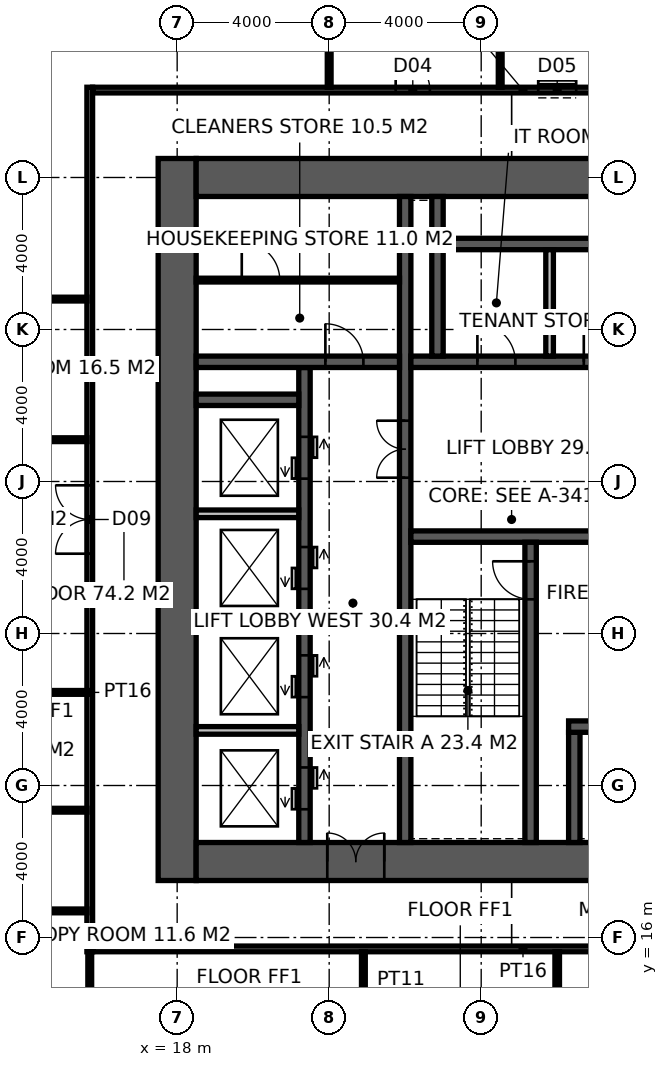
"""IFC4 building model, lengths in metres.
Left out: names, types, materials, properties, quantities, classifications, styles, units other than length and angle.
Written with IfcOpenShell. Run it as: python <this file> out.ifc"""

import sys

from ifc_helpers import new_model, si_unit, direction, frame, frame_2d, origin, place, context, subcontext, project, spatial, rectangle, extrude, element, fill, save


model = new_model("IFC4")
c1 = context("Model", 3, precision=1e-05, world=origin(), true_north=direction((0.0, 1.0)))
c2 = subcontext(c1, "Body", "Model", "MODEL_VIEW")
j1 = project(units=[si_unit("LENGTHUNIT", "METRE"), si_unit("PLANEANGLEUNIT", "RADIAN")], contexts=[c1])
p1 = place(None, origin())
s1 = spatial("IfcSite", under=j1, at=p1, CompositionType="ELEMENT")
p2 = place(p1, origin())
s2 = spatial("IfcBuilding", under=s1, at=p2, CompositionType="ELEMENT")
p3 = place(p2, frame((0.0, 0.0, 266.2)))
s3 = spatial("IfcBuildingStorey", under=s2, at=p3, CompositionType="ELEMENT", Elevation=266.2)
p4 = place(p3, frame((18.0, 17.5, -0.15), z_axis=(0.0, 0.0, 1.0), x_axis=(0.0, 1.0, 0.0)))
e1 = element("IfcWall", 1, at=p4, inside=s3, PredefinedType="SHEAR", context=c2, shape_type="SweptSolid", body=[
    extrude(rectangle(XDim=19.0, YDim=1.0, at=frame_2d((9.5, 0.0))), origin(), (0.0, 0.0, 1.0), 4.0),
])
p5 = place(p3, frame((18.5, 18.0, -0.15), z_axis=(0.0, 0.0, 1.0), x_axis=(1.0, 0.0, 0.0)))
e2 = element("IfcWall", 2, at=p5, inside=s3, PredefinedType="SHEAR", context=c2, shape_type="SweptSolid", body=[
    extrude(rectangle(XDim=17.6, YDim=1.0, at=frame_2d((8.8, 0.0))), origin(), (0.0, 0.0, 1.0), 4.0),
])
p6 = place(p5, frame((3.45, 0.0, 0.15)))
e3 = element("IfcOpeningElement", 3, at=p6, cuts=e2, PredefinedType="OPENING", context=c2, shape_type="SweptSolid", body=[
    extrude(rectangle(XDim=1.5, YDim=2.4, at=frame_2d((0.75, 1.2))), frame((0.0, 0.51, 0.0), z_axis=(0.0, -1.0, 0.0), x_axis=(1.0, 0.0, 0.0)), (0.0, 0.0, 1.0), 1.02),
])
p7 = place(p3, frame((18.5, 36.0, -0.15), z_axis=(0.0, 0.0, 1.0), x_axis=(1.0, 0.0, 0.0)))
e4 = element("IfcWall", 4, at=p7, inside=s3, PredefinedType="SHEAR", context=c2, shape_type="SweptSolid", body=[
    extrude(rectangle(XDim=17.6, YDim=1.0, at=frame_2d((8.8, 0.0))), origin(), (0.0, 0.0, 1.0), 4.0),
])
p8 = place(p3, frame((24.0, 18.5, -0.15), z_axis=(0.0, 0.0, 1.0), x_axis=(0.0, 1.0, 0.0)))
e5 = element("IfcWall", 5, at=p8, inside=s3, PredefinedType="SHEAR", context=c2, shape_type="SweptSolid", body=[
    extrude(rectangle(XDim=17.0, YDim=0.3, at=frame_2d((8.5, 0.0))), origin(), (0.0, 0.0, 1.0), 4.0),
])
p9 = place(p8, frame((9.6, 0.0, 0.15)))
e6 = element("IfcOpeningElement", 6, at=p9, cuts=e5, PredefinedType="OPENING", context=c2, shape_type="SweptSolid", body=[
    extrude(rectangle(XDim=1.5, YDim=2.4, at=frame_2d((0.75, 1.2))), frame((0.0, 0.16, 0.0), z_axis=(0.0, -1.0, 0.0), x_axis=(1.0, 0.0, 0.0)), (0.0, 0.0, 1.0), 0.32),
])
p10 = place(p3, frame((24.15, 26.55, -0.15), z_axis=(0.0, 0.0, 1.0), x_axis=(1.0, 0.0, 0.0)))
e7 = element("IfcWall", 7, at=p10, inside=s3, PredefinedType="SHEAR", context=c2, shape_type="SweptSolid", body=[
    extrude(rectangle(XDim=11.25, YDim=0.3, at=frame_2d((5.625, 0.0))), origin(), (0.0, 0.0, 1.0), 4.0),
])
p11 = place(p10, frame((9.25, 0.0, 0.15)))
e8 = element("IfcOpeningElement", 8, at=p11, cuts=e7, PredefinedType="OPENING", context=c2, shape_type="SweptSolid", body=[
    extrude(rectangle(XDim=1.0, YDim=2.2, at=frame_2d((0.5, 1.1))), frame((0.0, 0.16, 0.0), z_axis=(0.0, -1.0, 0.0), x_axis=(1.0, 0.0, 0.0)), (0.0, 0.0, 1.0), 0.32),
])
p12 = place(p10, frame((4.9, 0.0, 0.15)))
e9 = element("IfcOpeningElement", 9, at=p12, cuts=e7, PredefinedType="OPENING", context=c2, shape_type="SweptSolid", body=[
    extrude(rectangle(XDim=1.5, YDim=2.4, at=frame_2d((0.75, 1.2))), frame((0.0, 0.16, 0.0), z_axis=(0.0, -1.0, 0.0), x_axis=(1.0, 0.0, 0.0)), (0.0, 0.0, 1.0), 0.32),
])
p13 = place(p3, frame((27.3, 18.5, -0.15), z_axis=(0.0, 0.0, 1.0), x_axis=(0.0, 1.0, 0.0)))
e10 = element("IfcWall", 10, at=p13, inside=s3, PredefinedType="SHEAR", context=c2, shape_type="SweptSolid", body=[
    extrude(rectangle(XDim=7.9, YDim=0.3, at=frame_2d((3.95, 0.0))), origin(), (0.0, 0.0, 1.0), 4.0),
])
p14 = place(p13, frame((6.4, 0.0, 0.15)))
e11 = element("IfcOpeningElement", 11, at=p14, cuts=e10, PredefinedType="OPENING", context=c2, shape_type="SweptSolid", body=[
    extrude(rectangle(XDim=1.0, YDim=2.2, at=frame_2d((0.5, 1.1))), frame((0.0, 0.16, 0.0), z_axis=(0.0, -1.0, 0.0), x_axis=(1.0, 0.0, 0.0)), (0.0, 0.0, 1.0), 0.32),
])
p15 = place(p3, frame((28.45, 18.5, -0.15), z_axis=(0.0, 0.0, 1.0), x_axis=(0.0, 1.0, 0.0)))
e12 = element("IfcWall", 12, at=p15, inside=s3, PredefinedType="SHEAR", context=c2, shape_type="SweptSolid", body=[
    extrude(rectangle(XDim=2.9, YDim=0.3, at=frame_2d((1.45, 0.0))), origin(), (0.0, 0.0, 1.0), 4.0),
])
p16 = place(p3, frame((28.3, 21.55, -0.15), z_axis=(0.0, 0.0, 1.0), x_axis=(1.0, 0.0, 0.0)))
e13 = element("IfcWall", 13, at=p16, inside=s3, PredefinedType="SHEAR", context=c2, shape_type="SweptSolid", body=[
    extrude(rectangle(XDim=3.8, YDim=0.3, at=frame_2d((1.9, 0.0))), origin(), (0.0, 0.0, 1.0), 4.0),
])
p17 = place(p16, frame((1.05, 0.0, 0.15)))
e14 = element("IfcOpeningElement", 14, at=p17, cuts=e13, PredefinedType="OPENING", context=c2, shape_type="SweptSolid", body=[
    extrude(rectangle(XDim=1.3, YDim=2.4, at=frame_2d((0.65, 1.2))), frame((0.0, 0.16, 0.0), z_axis=(0.0, -1.0, 0.0), x_axis=(1.0, 0.0, 0.0)), (0.0, 0.0, 1.0), 0.32),
])
p18 = place(p3, frame((24.15, 31.15, -0.15), z_axis=(0.0, 0.0, 1.0), x_axis=(1.0, 0.0, 0.0)))
e15 = element("IfcWall", 15, at=p18, inside=s3, PredefinedType="SHEAR", context=c2, shape_type="SweptSolid", body=[
    extrude(rectangle(XDim=11.25, YDim=0.3, at=frame_2d((5.625, 0.0))), origin(), (0.0, 0.0, 1.0), 4.0),
])
p19 = place(p18, frame((1.75, 0.0, 0.15)))
e16 = element("IfcOpeningElement", 16, at=p19, cuts=e15, PredefinedType="OPENING", context=c2, shape_type="SweptSolid", body=[
    extrude(rectangle(XDim=1.0, YDim=2.2, at=frame_2d((0.5, 1.1))), frame((0.0, 0.16, 0.0), z_axis=(0.0, -1.0, 0.0), x_axis=(1.0, 0.0, 0.0)), (0.0, 0.0, 1.0), 0.32),
])
p20 = place(p18, frame((4.55, 0.0, 0.15)))
e17 = element("IfcOpeningElement", 17, at=p20, cuts=e15, PredefinedType="OPENING", context=c2, shape_type="SweptSolid", body=[
    extrude(rectangle(XDim=1.0, YDim=2.2, at=frame_2d((0.5, 1.1))), frame((0.0, 0.16, 0.0), z_axis=(0.0, -1.0, 0.0), x_axis=(1.0, 0.0, 0.0)), (0.0, 0.0, 1.0), 0.32),
])
p21 = place(p18, frame((7.25, 0.0, 0.15)))
e18 = element("IfcOpeningElement", 18, at=p21, cuts=e15, PredefinedType="OPENING", context=c2, shape_type="SweptSolid", body=[
    extrude(rectangle(XDim=1.4, YDim=2.4, at=frame_2d((0.7, 1.2))), frame((0.0, 0.16, 0.0), z_axis=(0.0, -1.0, 0.0), x_axis=(1.0, 0.0, 0.0)), (0.0, 0.0, 1.0), 0.32),
])
p22 = place(p3, frame((21.35, 18.5, -0.15), z_axis=(0.0, 0.0, 1.0), x_axis=(0.0, 1.0, 0.0)))
e19 = element("IfcWall", 19, at=p22, inside=s3, PredefinedType="SHEAR", context=c2, shape_type="SweptSolid", body=[
    extrude(rectangle(XDim=12.5, YDim=0.3, at=frame_2d((6.25, 0.0))), origin(), (0.0, 0.0, 1.0), 4.0),
])
p23 = place(p22, frame((0.875, 0.0, 0.15)))
e20 = element("IfcOpeningElement", 20, at=p23, cuts=e19, PredefinedType="OPENING", context=c2, shape_type="SweptSolid", body=[
    extrude(rectangle(XDim=1.1, YDim=2.2, at=frame_2d((0.55, 1.1))), frame((0.0, 0.16, 0.0), z_axis=(0.0, -1.0, 0.0), x_axis=(1.0, 0.0, 0.0)), (0.0, 0.0, 1.0), 0.32),
])
p24 = place(p22, frame((3.825, 0.0, 0.15)))
e21 = element("IfcOpeningElement", 21, at=p24, cuts=e19, PredefinedType="OPENING", context=c2, shape_type="SweptSolid", body=[
    extrude(rectangle(XDim=1.1, YDim=2.2, at=frame_2d((0.55, 1.1))), frame((0.0, 0.16, 0.0), z_axis=(0.0, -1.0, 0.0), x_axis=(1.0, 0.0, 0.0)), (0.0, 0.0, 1.0), 0.32),
])
p25 = place(p22, frame((6.675, 0.0, 0.15)))
e22 = element("IfcOpeningElement", 22, at=p25, cuts=e19, PredefinedType="OPENING", context=c2, shape_type="SweptSolid", body=[
    extrude(rectangle(XDim=1.1, YDim=2.2, at=frame_2d((0.55, 1.1))), frame((0.0, 0.16, 0.0), z_axis=(0.0, -1.0, 0.0), x_axis=(1.0, 0.0, 0.0)), (0.0, 0.0, 1.0), 0.32),
])
p26 = place(p22, frame((9.575, 0.0, 0.15)))
e23 = element("IfcOpeningElement", 23, at=p26, cuts=e19, PredefinedType="OPENING", context=c2, shape_type="SweptSolid", body=[
    extrude(rectangle(XDim=1.1, YDim=2.2, at=frame_2d((0.55, 1.1))), frame((0.0, 0.16, 0.0), z_axis=(0.0, -1.0, 0.0), x_axis=(1.0, 0.0, 0.0)), (0.0, 0.0, 1.0), 0.32),
])
p27 = place(p3, frame((18.5, 31.15, -0.15), z_axis=(0.0, 0.0, 1.0), x_axis=(1.0, 0.0, 0.0)))
e24 = element("IfcWall", 24, at=p27, inside=s3, PredefinedType="SHEAR", context=c2, shape_type="SweptSolid", body=[
    extrude(rectangle(XDim=5.35, YDim=0.3, at=frame_2d((2.675, 0.0))), origin(), (0.0, 0.0, 1.0), 4.0),
])
p28 = place(p27, frame((3.4, 0.0, 0.15)))
e25 = element("IfcOpeningElement", 25, at=p28, cuts=e24, PredefinedType="OPENING", context=c2, shape_type="SweptSolid", body=[
    extrude(rectangle(XDim=1.0, YDim=2.2, at=frame_2d((0.5, 1.1))), frame((0.0, 0.16, 0.0), z_axis=(0.0, -1.0, 0.0), x_axis=(1.0, 0.0, 0.0)), (0.0, 0.0, 1.0), 0.32),
])
p29 = place(p3, frame((18.5, 30.15, -0.15), z_axis=(0.0, 0.0, 1.0), x_axis=(1.0, 0.0, 0.0)))
e26 = element("IfcWall", 26, at=p29, inside=s3, PredefinedType="SHEAR", context=c2, shape_type="SweptSolid", body=[
    extrude(rectangle(XDim=2.7, YDim=0.3, at=frame_2d((1.35, 0.0))), origin(), (0.0, 0.0, 1.0), 4.0),
])
p30 = place(p3, frame((24.85, 31.3, -0.15), z_axis=(0.0, 0.0, 1.0), x_axis=(0.0, 1.0, 0.0)))
e27 = element("IfcWall", 27, at=p30, inside=s3, PredefinedType="SHEAR", context=c2, shape_type="SweptSolid", body=[
    extrude(rectangle(XDim=4.2, YDim=0.3, at=frame_2d((2.1, 0.0))), origin(), (0.0, 0.0, 1.0), 4.0),
])
p31 = place(p3, frame((25.0, 34.25, -0.15), z_axis=(0.0, 0.0, 1.0), x_axis=(1.0, 0.0, 0.0)))
e28 = element("IfcWall", 28, at=p31, inside=s3, PredefinedType="SHEAR", context=c2, shape_type="SweptSolid", body=[
    extrude(rectangle(XDim=8.6, YDim=0.3, at=frame_2d((4.3, 0.0))), origin(), (0.0, 0.0, 1.0), 4.0),
])
p32 = place(p3, frame((27.8, 31.3, 0.0), z_axis=(0.0, 0.0, 1.0), x_axis=(0.0, 1.0, 0.0)))
e29 = element("IfcWall", 29, at=p32, inside=s3, PredefinedType="SOLIDWALL", context=c2, shape_type="SweptSolid", body=[
    extrude(rectangle(XDim=2.8, YDim=0.2, at=frame_2d((1.4, 0.0))), origin(), (0.0, 0.0, 1.0), 3.85),
])
for number, where, z_axis, x_axis in (
    (30, (18.5, 21.45, -0.15), (0.0, 0.0, 1.0), (1.0, 0.0, 0.0)),
    (31, (18.5, 24.3, -0.15), (0.0, 0.0, 1.0), (1.0, 0.0, 0.0)),
    (32, (18.5, 27.15, -0.15), (0.0, 0.0, 1.0), (1.0, 0.0, 0.0)),
):
    element("IfcWall", number, at=place(p3, frame(where, z_axis=z_axis, x_axis=x_axis)), inside=s3, PredefinedType="SOLIDWALL", context=c2, shape_type="SweptSolid", body=[
        extrude(rectangle(XDim=2.7, YDim=0.2, at=frame_2d((1.35, 0.0))), origin(), (0.0, 0.0, 1.0), 4.0),
    ])
p33 = place(p3, frame((18.5, 33.3, 0.0), z_axis=(0.0, 0.0, 1.0), x_axis=(1.0, 0.0, 0.0)))
e33 = element("IfcWall", 33, at=p33, inside=s3, PredefinedType="PARTITIONING", context=c2, shape_type="SweptSolid", body=[
    extrude(rectangle(XDim=5.35, YDim=0.1, at=frame_2d((2.675, 0.0))), origin(), (0.0, 0.0, 1.0), 3.85),
])
p34 = place(p33, frame((1.2, 0.0, 0.0)))
e34 = element("IfcOpeningElement", 34, at=p34, cuts=e33, PredefinedType="OPENING", context=c2, shape_type="SweptSolid", body=[
    extrude(rectangle(XDim=1.0, YDim=2.2, at=frame_2d((0.5, 1.1))), frame((0.0, 0.06, 0.0), z_axis=(0.0, -1.0, 0.0), x_axis=(1.0, 0.0, 0.0)), (0.0, 0.0, 1.0), 0.12),
])
p35 = place(p3, frame((15.7, 15.625, 0.0), z_axis=(0.0, 0.0, 1.0), x_axis=(0.0, 1.0, 0.0)))
e35 = element("IfcWall", 35, at=p35, inside=s3, PredefinedType="PARTITIONING", context=c2, shape_type="SweptSolid", body=[
    extrude(rectangle(XDim=22.75, YDim=0.15, at=frame_2d((11.375, 0.0))), origin(), (0.0, 0.0, 1.0), 3.85),
])
p36 = place(p35, frame((10.475, 0.0, 0.0)))
e36 = element("IfcOpeningElement", 36, at=p36, cuts=e35, PredefinedType="OPENING", context=c2, shape_type="SweptSolid", body=[
    extrude(rectangle(XDim=1.8, YDim=2.4, at=frame_2d((0.9, 1.2))), frame((0.0, 0.085, 0.0), z_axis=(0.0, -1.0, 0.0), x_axis=(1.0, 0.0, 0.0)), (0.0, 0.0, 1.0), 0.17),
])
p37 = place(p3, frame((15.775, 15.7, 0.0), z_axis=(0.0, 0.0, 1.0), x_axis=(1.0, 0.0, 0.0)))
e37 = element("IfcWall", 37, at=p37, inside=s3, PredefinedType="PARTITIONING", context=c2, shape_type="SweptSolid", body=[
    extrude(rectangle(XDim=22.65, YDim=0.15, at=frame_2d((11.325, 0.0))), origin(), (0.0, 0.0, 1.0), 3.85),
])
p38 = place(p3, frame((15.775, 38.3, 0.0), z_axis=(0.0, 0.0, 1.0), x_axis=(1.0, 0.0, 0.0)))
e38 = element("IfcWall", 38, at=p38, inside=s3, PredefinedType="PARTITIONING", context=c2, shape_type="SweptSolid", body=[
    extrude(rectangle(XDim=22.65, YDim=0.15, at=frame_2d((11.325, 0.0))), origin(), (0.0, 0.0, 1.0), 3.85),
])
p39 = place(p38, frame((7.975, 0.0, 0.0)))
e39 = element("IfcOpeningElement", 39, at=p39, cuts=e38, PredefinedType="OPENING", context=c2, shape_type="SweptSolid", body=[
    extrude(rectangle(XDim=0.9, YDim=2.1, at=frame_2d((0.45, 1.05))), frame((0.0, 0.085, 0.0), z_axis=(0.0, -1.0, 0.0), x_axis=(1.0, 0.0, 0.0)), (0.0, 0.0, 1.0), 0.17),
])
p40 = place(p38, frame((11.725, 0.0, 0.0)))
e40 = element("IfcOpeningElement", 40, at=p40, cuts=e38, PredefinedType="OPENING", context=c2, shape_type="SweptSolid", body=[
    extrude(rectangle(XDim=1.0, YDim=2.1, at=frame_2d((0.5, 1.05))), frame((0.0, 0.085, 0.0), z_axis=(0.0, -1.0, 0.0), x_axis=(1.0, 0.0, 0.0)), (0.0, 0.0, 1.0), 0.17),
])
p41 = place(p38, frame((15.575, 0.0, 0.0)))
e41 = element("IfcOpeningElement", 41, at=p41, cuts=e38, PredefinedType="OPENING", context=c2, shape_type="SweptSolid", body=[
    extrude(rectangle(XDim=0.9, YDim=2.1, at=frame_2d((0.45, 1.05))), frame((0.0, 0.085, 0.0), z_axis=(0.0, -1.0, 0.0), x_axis=(1.0, 0.0, 0.0)), (0.0, 0.0, 1.0), 0.17),
])
p42 = place(p3, frame((22.0, 38.375, 0.0), z_axis=(0.0, 0.0, 1.0), x_axis=(0.0, 1.0, 0.0)))
e42 = element("IfcWall", 42, at=p42, inside=s3, PredefinedType="PARTITIONING", context=c2, shape_type="SweptSolid", body=[
    extrude(rectangle(XDim=3.675, YDim=0.1, at=frame_2d((1.837, 0.0))), origin(), (0.0, 0.0, 1.0), 2.65),
])
p43 = place(p3, frame((26.5, 38.375, 0.0), z_axis=(0.0, 0.0, 1.0), x_axis=(0.0, 1.0, 0.0)))
e43 = element("IfcWall", 43, at=p43, inside=s3, PredefinedType="PARTITIONING", context=c2, shape_type="SweptSolid", body=[
    extrude(rectangle(XDim=3.575, YDim=0.1, at=frame_2d((1.788, 0.0))), origin(), (0.0, 0.0, 1.0), 2.65),
])
p44 = place(p3, frame((28.0, 4.3, 0.0), z_axis=(0.0, 0.0, 1.0), x_axis=(0.0, 1.0, 0.0)))
e44 = element("IfcWall", 44, at=p44, inside=s3, PredefinedType="PARTITIONING", context=c2, shape_type="SweptSolid", body=[
    extrude(rectangle(XDim=11.325, YDim=0.12, at=frame_2d((5.663, 0.0))), origin(), (0.0, 0.0, 1.0), 3.85),
])
p45 = place(p3, frame((10.85, 16.7, 0.0), z_axis=(0.0, 0.0, 1.0), x_axis=(1.0, 0.0, 0.0)))
e45 = element("IfcWall", 45, at=p45, inside=s3, PredefinedType="PARTITIONING", context=c2, shape_type="SweptSolid", body=[
    extrude(rectangle(XDim=4.775, YDim=0.1, at=frame_2d((2.387, 0.0))), origin(), (0.0, 0.0, 1.0), 3.85),
])
p46 = place(p3, frame((10.95, 19.35, 0.0), z_axis=(0.0, 0.0, 1.0), x_axis=(1.0, 0.0, 0.0)))
e46 = element("IfcWall", 46, at=p46, inside=s3, PredefinedType="PARTITIONING", context=c2, shape_type="SweptSolid", body=[
    extrude(rectangle(XDim=4.675, YDim=0.1, at=frame_2d((2.337, 0.0))), origin(), (0.0, 0.0, 1.0), 3.85),
])
for number, where, z_axis, x_axis in (
    (47, (10.85, 22.45, 0.0), (0.0, 0.0, 1.0), (1.0, 0.0, 0.0)),
    (48, (10.85, 29.1, 0.0), (0.0, 0.0, 1.0), (1.0, 0.0, 0.0)),
    (49, (10.85, 32.8, 0.0), (0.0, 0.0, 1.0), (1.0, 0.0, 0.0)),
):
    element("IfcWall", number, at=place(p3, frame(where, z_axis=z_axis, x_axis=x_axis)), inside=s3, PredefinedType="PARTITIONING", context=c2, shape_type="SweptSolid", body=[
        extrude(rectangle(XDim=4.775, YDim=0.1, at=frame_2d((2.387, 0.0))), origin(), (0.0, 0.0, 1.0), 3.85),
    ])
for number, where, z_axis, x_axis in (
    (50, (15.7, 12.15, 0.0), (0.0, 0.0, 1.0), (0.0, 1.0, 0.0)),
    (51, (22.9, 12.15, 0.0), (0.0, 0.0, 1.0), (0.0, 1.0, 0.0)),
):
    element("IfcWall", number, at=place(p3, frame(where, z_axis=z_axis, x_axis=x_axis)), inside=s3, PredefinedType="PARTITIONING", context=c2, shape_type="SweptSolid", body=[
        extrude(rectangle(XDim=3.475, YDim=0.1, at=frame_2d((1.738, 0.0))), origin(), (0.0, 0.0, 1.0), 3.85),
    ])
p47 = place(p14, origin())
e52 = element("IfcDoor", 52, at=p47, inside=s3, OperationType="SINGLE_SWING_RIGHT", PredefinedType="DOOR", context=c2, shape_type="SweptSolid", body=[
    extrude(rectangle(XDim=1.0, YDim=2.2, at=frame_2d((0.5, 1.1))), frame((0.0, 0.025, 0.0), z_axis=(0.0, -1.0, 0.0), x_axis=(1.0, 0.0, 0.0)), (0.0, 0.0, 1.0), 0.05),
])
fill(e11, e52)
p48 = place(p9, origin())
e53 = element("IfcDoor", 53, at=p48, inside=s3, OperationType="DOUBLE_DOOR_DOUBLE_SWING", PredefinedType="DOOR", context=c2, shape_type="SweptSolid", body=[
    extrude(rectangle(XDim=1.5, YDim=2.4, at=frame_2d((0.75, 1.2))), frame((0.0, 0.025, 0.0), z_axis=(0.0, -1.0, 0.0), x_axis=(1.0, 0.0, 0.0)), (0.0, 0.0, 1.0), 0.05),
])
fill(e6, e53)
p49 = place(p28, origin())
e54 = element("IfcDoor", 54, at=p49, inside=s3, OperationType="SINGLE_SWING_LEFT", PredefinedType="DOOR", context=c2, shape_type="SweptSolid", body=[
    extrude(rectangle(XDim=1.0, YDim=2.2, at=frame_2d((0.5, 1.1))), frame((0.0, 0.025, 0.0), z_axis=(0.0, -1.0, 0.0), x_axis=(1.0, 0.0, 0.0)), (0.0, 0.0, 1.0), 0.05),
])
fill(e25, e54)
p50 = place(p34, origin())
e55 = element("IfcDoor", 55, at=p50, inside=s3, OperationType="SINGLE_SWING_LEFT", PredefinedType="DOOR", context=c2, shape_type="SweptSolid", body=[
    extrude(rectangle(XDim=1.0, YDim=2.2, at=frame_2d((0.5, 1.1))), frame((0.0, 0.025, 0.0), z_axis=(0.0, -1.0, 0.0), x_axis=(1.0, 0.0, 0.0)), (0.0, 0.0, 1.0), 0.05),
])
fill(e34, e55)
p51 = place(p19, origin())
e56 = element("IfcDoor", 56, at=p51, inside=s3, OperationType="SINGLE_SWING_LEFT", PredefinedType="DOOR", context=c2, shape_type="SweptSolid", body=[
    extrude(rectangle(XDim=1.0, YDim=2.2, at=frame_2d((0.5, 1.1))), frame((0.0, 0.025, 0.0), z_axis=(0.0, -1.0, 0.0), x_axis=(1.0, 0.0, 0.0)), (0.0, 0.0, 1.0), 0.05),
])
fill(e16, e56)
p52 = place(p20, origin())
e57 = element("IfcDoor", 57, at=p52, inside=s3, OperationType="SINGLE_SWING_LEFT", PredefinedType="DOOR", context=c2, shape_type="SweptSolid", body=[
    extrude(rectangle(XDim=1.0, YDim=2.2, at=frame_2d((0.5, 1.1))), frame((0.0, 0.025, 0.0), z_axis=(0.0, -1.0, 0.0), x_axis=(1.0, 0.0, 0.0)), (0.0, 0.0, 1.0), 0.05),
])
fill(e17, e57)
p53 = place(p6, origin())
e58 = element("IfcDoor", 58, at=p53, inside=s3, OperationType="DOUBLE_DOOR_DOUBLE_SWING", PredefinedType="DOOR", context=c2, shape_type="SweptSolid", body=[
    extrude(rectangle(XDim=1.5, YDim=2.4, at=frame_2d((0.75, 1.2))), frame((0.0, 0.025, 0.0), z_axis=(0.0, -1.0, 0.0), x_axis=(1.0, 0.0, 0.0)), (0.0, 0.0, 1.0), 0.05),
])
fill(e3, e58)
p54 = place(p39, origin())
e59 = element("IfcDoor", 59, at=p54, inside=s3, OperationType="SINGLE_SWING_LEFT", PredefinedType="DOOR", context=c2, shape_type="SweptSolid", body=[
    extrude(rectangle(XDim=0.9, YDim=2.1, at=frame_2d((0.45, 1.05))), frame((0.0, 0.025, 0.0), z_axis=(0.0, -1.0, 0.0), x_axis=(1.0, 0.0, 0.0)), (0.0, 0.0, 1.0), 0.05),
])
fill(e39, e59)
p55 = place(p40, origin())
e60 = element("IfcDoor", 60, at=p55, inside=s3, OperationType="SLIDING_TO_LEFT", PredefinedType="DOOR", context=c2, shape_type="SweptSolid", body=[
    extrude(rectangle(XDim=1.0, YDim=2.1, at=frame_2d((0.5, 1.05))), frame((0.0, 0.025, 0.0), z_axis=(0.0, -1.0, 0.0), x_axis=(1.0, 0.0, 0.0)), (0.0, 0.0, 1.0), 0.05),
])
fill(e40, e60)
p56 = place(p36, origin())
e61 = element("IfcDoor", 61, at=p56, inside=s3, OperationType="DOUBLE_DOOR_DOUBLE_SWING", PredefinedType="DOOR", context=c2, shape_type="SweptSolid", body=[
    extrude(rectangle(XDim=1.8, YDim=2.4, at=frame_2d((0.9, 1.2))), frame((0.0, 0.025, 0.0), z_axis=(0.0, -1.0, 0.0), x_axis=(1.0, 0.0, 0.0)), (0.0, 0.0, 1.0), 0.05),
])
fill(e36, e61)
p57 = place(p23, origin())
e62 = element("IfcDoor", 62, at=p57, inside=s3, OperationType="DOUBLE_DOOR_SLIDING", PredefinedType="DOOR", context=c2, shape_type="SweptSolid", body=[
    extrude(rectangle(XDim=1.1, YDim=2.2, at=frame_2d((0.55, 1.1))), frame((0.0, 0.025, 0.0), z_axis=(0.0, -1.0, 0.0), x_axis=(1.0, 0.0, 0.0)), (0.0, 0.0, 1.0), 0.05),
])
fill(e20, e62)
p58 = place(p24, origin())
e63 = element("IfcDoor", 63, at=p58, inside=s3, OperationType="DOUBLE_DOOR_SLIDING", PredefinedType="DOOR", context=c2, shape_type="SweptSolid", body=[
    extrude(rectangle(XDim=1.1, YDim=2.2, at=frame_2d((0.55, 1.1))), frame((0.0, 0.025, 0.0), z_axis=(0.0, -1.0, 0.0), x_axis=(1.0, 0.0, 0.0)), (0.0, 0.0, 1.0), 0.05),
])
fill(e21, e63)
p59 = place(p25, origin())
e64 = element("IfcDoor", 64, at=p59, inside=s3, OperationType="DOUBLE_DOOR_SLIDING", PredefinedType="DOOR", context=c2, shape_type="SweptSolid", body=[
    extrude(rectangle(XDim=1.1, YDim=2.2, at=frame_2d((0.55, 1.1))), frame((0.0, 0.025, 0.0), z_axis=(0.0, -1.0, 0.0), x_axis=(1.0, 0.0, 0.0)), (0.0, 0.0, 1.0), 0.05),
])
fill(e22, e64)
p60 = place(p26, origin())
e65 = element("IfcDoor", 65, at=p60, inside=s3, OperationType="DOUBLE_DOOR_SLIDING", PredefinedType="DOOR", context=c2, shape_type="SweptSolid", body=[
    extrude(rectangle(XDim=1.1, YDim=2.2, at=frame_2d((0.55, 1.1))), frame((0.0, 0.025, 0.0), z_axis=(0.0, -1.0, 0.0), x_axis=(1.0, 0.0, 0.0)), (0.0, 0.0, 1.0), 0.05),
])
fill(e23, e65)
save(model, sys.argv[1])
